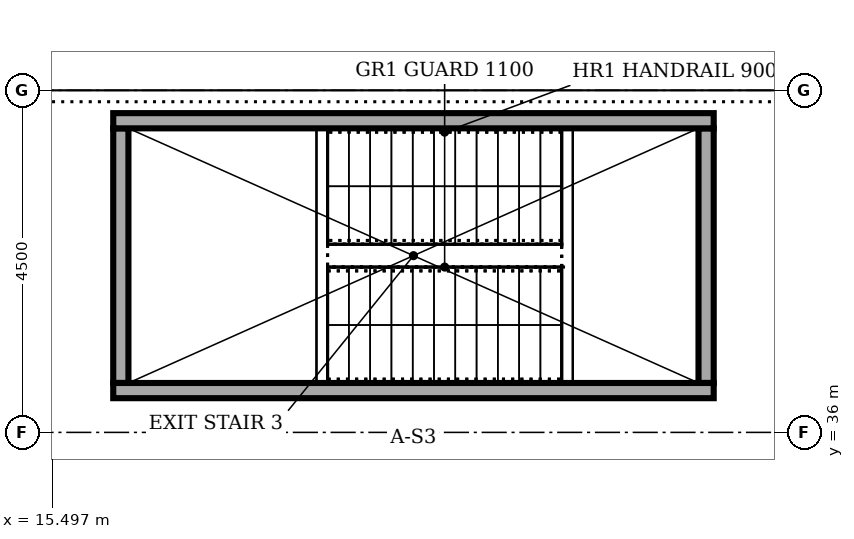
"""IFC4 building model, lengths in metres.
Left out: names, types, materials, properties, quantities, classifications, styles, units other than length and angle.
Written with IfcOpenShell. Run it as: python <this file> out.ifc"""

import sys

from ifc_helpers import new_model, si_unit, direction, frame, frame_2d, origin, place, context, subcontext, project, spatial, rectangle, extrude, element, save


model = new_model("IFC4")
c1 = context("Model", 3, precision=1e-05, world=origin(), true_north=direction((0.0, 1.0)))
c2 = subcontext(c1, "Body", "Model", "MODEL_VIEW")
j1 = project(units=[si_unit("LENGTHUNIT", "METRE"), si_unit("PLANEANGLEUNIT", "RADIAN")], contexts=[c1])
p1 = place(None, origin())
s1 = spatial("IfcSite", under=j1, at=p1, CompositionType="ELEMENT")
p2 = place(p1, origin())
s2 = spatial("IfcBuilding", under=s1, at=p2, CompositionType="ELEMENT")
p3 = place(p2, frame((0.0, 0.0, 77.0)))
s3 = spatial("IfcBuildingStorey", under=s2, at=p3, CompositionType="ELEMENT", Elevation=77.0)
for number, where, z_axis, x_axis in (
    (1, (16.3, 36.55, 0.0), (0.0, 0.0, 1.0), (1.0, 0.0, 0.0)),
    (2, (16.3, 40.1, 0.0), (0.0, 0.0, 1.0), (1.0, 0.0, 0.0)),
):
    element("IfcWall", number, at=place(p3, frame(where, z_axis=z_axis, x_axis=x_axis)), inside=s3, PredefinedType="SOLIDWALL", context=c2, shape_type="SweptSolid", body=[
        extrude(rectangle(XDim=7.9, YDim=0.2, at=frame_2d((3.95, 0.0))), origin(), (0.0, 0.0, 1.0), 7.75),
    ])
for number, where, z_axis, x_axis in (
    (3, (16.4, 36.65, 0.0), (0.0, 0.0, 1.0), (0.0, 1.0, 0.0)),
    (4, (24.1, 36.65, 0.0), (0.0, 0.0, 1.0), (0.0, 1.0, 0.0)),
):
    element("IfcWall", number, at=place(p3, frame(where, z_axis=z_axis, x_axis=x_axis)), inside=s3, PredefinedType="SOLIDWALL", context=c2, shape_type="SweptSolid", body=[
        extrude(rectangle(XDim=3.35, YDim=0.2, at=frame_2d((1.675, 0.0))), origin(), (0.0, 0.0, 1.0), 7.75),
    ])
save(model, sys.argv[1])
